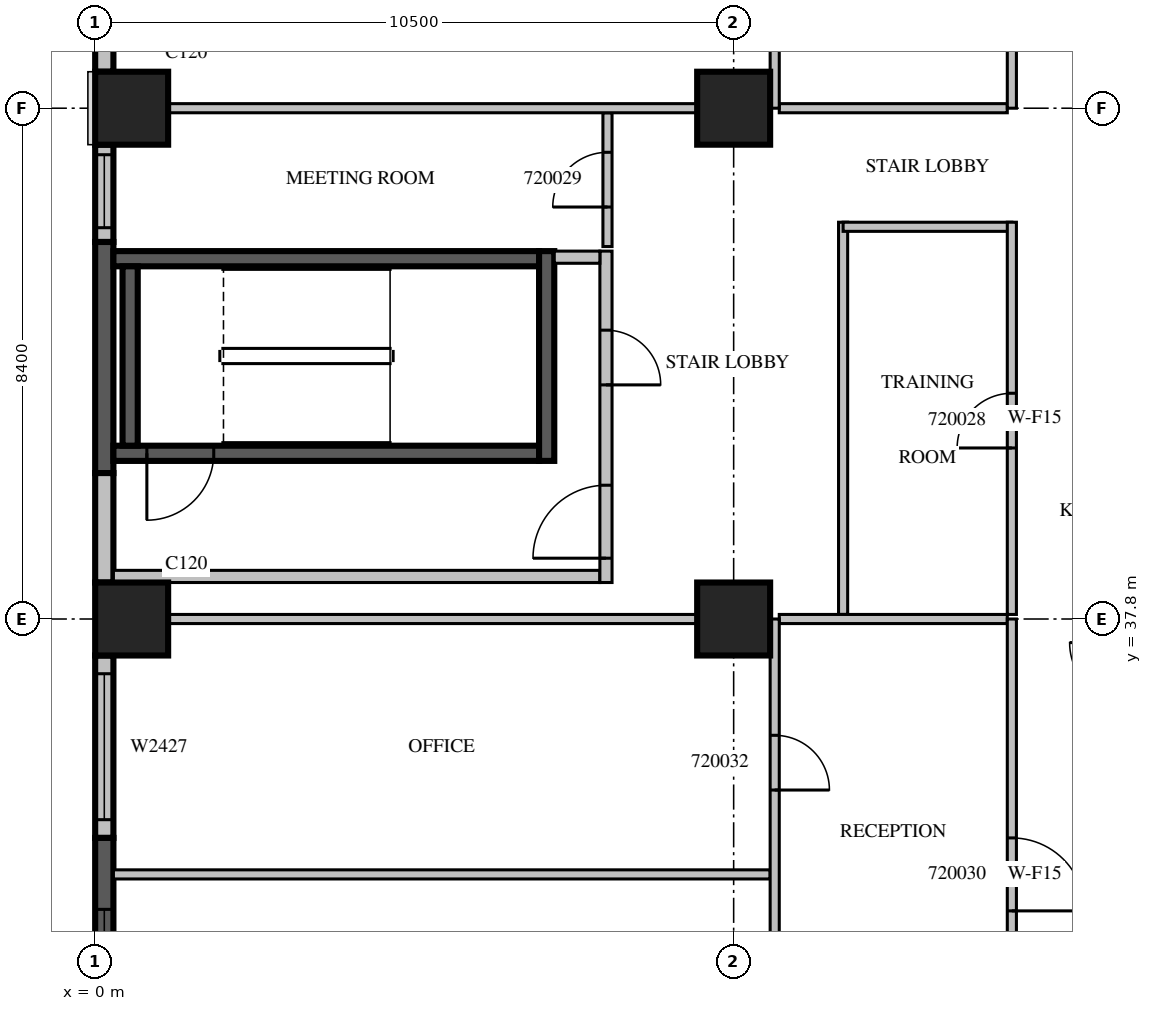
"""IFC4 building model, lengths in metres.
Left out: names, types, materials, properties, quantities, classifications, styles, units other than length and angle.
Written with IfcOpenShell. Run it as: python <this file> out.ifc"""

import sys

from ifc_helpers import new_model, si_unit, direction, frame, frame_2d, origin, origin_2d, place, context, subcontext, project, spatial, rectangle, extrude, source, transform, mapped, element, fill, save


model = new_model("IFC4")
c1 = context("Model", 3, precision=1e-05, world=origin(), true_north=direction((0.0, 1.0)))
c2 = subcontext(c1, "Body", "Model", "MODEL_VIEW")
j1 = project(units=[si_unit("LENGTHUNIT", "METRE"), si_unit("PLANEANGLEUNIT", "RADIAN")], contexts=[c1])
p1 = place(None, origin())
s1 = spatial("IfcSite", under=j1, at=p1, CompositionType="ELEMENT")
p2 = place(p1, origin())
s2 = spatial("IfcBuilding", under=s1, at=p2, CompositionType="ELEMENT")
p3 = place(p2, frame((0.0, 0.0, 95.1)))
s3 = spatial("IfcBuildingStorey", under=s2, at=p3, CompositionType="ELEMENT", Elevation=95.1)
m1 = source(origin(), c2, "Body", "SweptSolid", [
    extrude(rectangle(XDim=1.2, YDim=1.2, at=origin_2d()), origin(), (0.0, 0.0, 1.0), 4.2),
])
for number, where, z_axis, x_axis in (
    (1, (0.6, 37.8, 0.0), (0.0, 0.0, 1.0), (1.0, 0.0, 0.0)),
    (2, (10.5, 37.8, 0.0), (0.0, 0.0, 1.0), (1.0, 0.0, 0.0)),
    (3, (0.6, 46.2, 0.0), (0.0, 0.0, 1.0), (1.0, 0.0, 0.0)),
    (4, (10.5, 46.2, 0.0), (0.0, 0.0, 1.0), (1.0, 0.0, 0.0)),
):
    element("IfcColumn", number, at=place(p3, frame(where, z_axis=z_axis, x_axis=x_axis)), inside=s3, PredefinedType="COLUMN", context=c2, shape_type="MappedRepresentation", body=[
        mapped(m1, transform((0.0, 0.0, 0.0), scale=1.0)),
    ])
m2 = source(origin(), c2, "Body", "SweptSolid", [
    extrude(rectangle(XDim=0.66, YDim=0.3, at=frame_2d((0.33, 0.0))), origin(), (0.0, 0.0, 1.0), 3.8),
])
p4 = place(p3, frame((0.15, 47.46, 0.0), z_axis=(0.0, 0.0, 1.0), x_axis=(0.0, -1.0, 0.0)))
e5 = element("IfcWall", 5, at=p4, inside=s3, PredefinedType="STANDARD", context=c2, shape_type="MappedRepresentation", body=[
    mapped(m2, transform((0.0, 0.0, 0.0), scale=1.0)),
])
m3 = source(origin(), c2, "Body", "SweptSolid", [
    extrude(rectangle(XDim=1.6, YDim=0.3, at=frame_2d((0.8, 0.0))), origin(), (0.0, 0.0, 1.0), 3.8),
])
p5 = place(p3, frame((0.15, 45.6, 0.0), z_axis=(0.0, 0.0, 1.0), x_axis=(0.0, -1.0, 0.0)))
e6 = element("IfcWall", 6, at=p5, inside=s3, PredefinedType="STANDARD", context=c2, shape_type="MappedRepresentation", body=[
    mapped(m3, transform((0.0, 0.0, 0.0), scale=1.0)),
])
m4 = source(origin(), c2, "Body", "SweptSolid", [
    extrude(rectangle(XDim=1.2, YDim=2.7, at=frame_2d((0.6, 1.35))), frame((0.0, 0.16, 0.0), z_axis=(0.0, -1.0, 0.0), x_axis=(1.0, 0.0, 0.0)), (0.0, 0.0, 1.0), 0.32),
])
p6 = place(p5, frame((0.165, 0.0, 0.6)))
e7 = element("IfcOpeningElement", 7, at=p6, cuts=e6, PredefinedType="OPENING", context=c2, shape_type="MappedRepresentation", body=[
    mapped(m4, transform((0.0, 0.0, 0.0), scale=1.0)),
])
m5 = source(origin(), c2, "Body", "SweptSolid", [
    extrude(rectangle(XDim=3.8, YDim=0.3, at=frame_2d((1.9, 0.0))), origin(), (0.0, 0.0, 1.0), 3.8),
])
p7 = place(p3, frame((0.15, 44.0, 0.0), z_axis=(0.0, 0.0, 1.0), x_axis=(0.0, -1.0, 0.0)))
e8 = element("IfcWall", 8, at=p7, inside=s3, PredefinedType="SOLIDWALL", context=c2, shape_type="MappedRepresentation", body=[
    mapped(m5, transform((0.0, 0.0, 0.0), scale=1.0)),
])
m6 = source(origin(), c2, "Body", "SweptSolid", [
    extrude(rectangle(XDim=1.8, YDim=0.3, at=frame_2d((0.9, 0.0))), origin(), (0.0, 0.0, 1.0), 3.8),
])
p8 = place(p3, frame((0.15, 40.2, 0.0), z_axis=(0.0, 0.0, 1.0), x_axis=(0.0, -1.0, 0.0)))
e9 = element("IfcWall", 9, at=p8, inside=s3, PredefinedType="STANDARD", context=c2, shape_type="MappedRepresentation", body=[
    mapped(m6, transform((0.0, 0.0, 0.0), scale=1.0)),
])
m7 = source(origin(), c2, "Body", "SweptSolid", [
    extrude(rectangle(XDim=3.0, YDim=0.3, at=frame_2d((1.5, 0.0))), origin(), (0.0, 0.0, 1.0), 3.8),
])
p9 = place(p3, frame((0.15, 37.2, 0.0), z_axis=(0.0, 0.0, 1.0), x_axis=(0.0, -1.0, 0.0)))
e10 = element("IfcWall", 10, at=p9, inside=s3, PredefinedType="STANDARD", context=c2, shape_type="MappedRepresentation", body=[
    mapped(m7, transform((0.0, 0.0, 0.0), scale=1.0)),
])
m8 = source(origin(), c2, "Body", "SweptSolid", [
    extrude(rectangle(XDim=2.4, YDim=2.7, at=frame_2d((1.2, 1.35))), frame((0.0, 0.16, 0.0), z_axis=(0.0, -1.0, 0.0), x_axis=(1.0, 0.0, 0.0)), (0.0, 0.0, 1.0), 0.32),
])
p10 = place(p9, frame((0.3, 0.0, 0.6)))
e11 = element("IfcOpeningElement", 11, at=p10, cuts=e10, PredefinedType="OPENING", context=c2, shape_type="MappedRepresentation", body=[
    mapped(m8, transform((0.0, 0.0, 0.0), scale=1.0)),
])
m9 = source(origin(), c2, "Body", "SweptSolid", [
    extrude(rectangle(XDim=4.2, YDim=0.3, at=frame_2d((2.1, 0.0))), origin(), (0.0, 0.0, 1.0), 3.8),
])
p11 = place(p3, frame((0.15, 34.2, 0.0), z_axis=(0.0, 0.0, 1.0), x_axis=(0.0, -1.0, 0.0)))
e12 = element("IfcWall", 12, at=p11, inside=s3, PredefinedType="SOLIDWALL", context=c2, shape_type="MappedRepresentation", body=[
    mapped(m9, transform((0.0, 0.0, 0.0), scale=1.0)),
])
m10 = source(origin(), c2, "Body", "SweptSolid", [
    extrude(rectangle(XDim=1.8, YDim=2.7, at=frame_2d((0.9, 1.35))), frame((0.0, 0.16, 0.0), z_axis=(0.0, -1.0, 0.0), x_axis=(1.0, 0.0, 0.0)), (0.0, 0.0, 1.0), 0.32),
])
p12 = place(p11, frame((1.175, 0.0, 0.6)))
e13 = element("IfcOpeningElement", 13, at=p12, cuts=e12, PredefinedType="OPENING", context=c2, shape_type="MappedRepresentation", body=[
    mapped(m10, transform((0.0, 0.0, 0.0), scale=1.0)),
])
m11 = source(origin(), c2, "Body", "SweptSolid", [
    extrude(rectangle(XDim=7.0, YDim=0.25, at=frame_2d((3.5, 0.0))), origin(), (0.0, 0.0, 1.0), 3.8),
])
p13 = place(p3, frame((0.3, 40.525, 0.0), z_axis=(0.0, 0.0, 1.0), x_axis=(1.0, 0.0, 0.0)))
e14 = element("IfcWall", 14, at=p13, inside=s3, PredefinedType="SOLIDWALL", context=c2, shape_type="MappedRepresentation", body=[
    mapped(m11, transform((0.0, 0.0, 0.0), scale=1.0)),
])
m12 = source(origin(), c2, "Body", "SweptSolid", [
    extrude(rectangle(XDim=1.1, YDim=2.1, at=frame_2d((0.55, 1.05))), frame((0.0, 0.135, 0.0), z_axis=(0.0, -1.0, 0.0), x_axis=(1.0, 0.0, 0.0)), (0.0, 0.0, 1.0), 0.27),
])
p14 = place(p13, frame((0.55, 0.0, 0.0)))
e15 = element("IfcOpeningElement", 15, at=p14, cuts=e14, PredefinedType="OPENING", context=c2, shape_type="MappedRepresentation", body=[
    mapped(m12, transform((0.0, 0.0, 0.0), scale=1.0)),
])
p15 = place(p3, frame((0.3, 43.725, 0.0), z_axis=(0.0, 0.0, 1.0), x_axis=(1.0, 0.0, 0.0)))
e16 = element("IfcWall", 16, at=p15, inside=s3, PredefinedType="SOLIDWALL", context=c2, shape_type="MappedRepresentation", body=[
    mapped(m11, transform((0.0, 0.0, 0.0), scale=1.0)),
])
m13 = source(origin(), c2, "Body", "SweptSolid", [
    extrude(rectangle(XDim=3.45, YDim=0.25, at=frame_2d((1.725, 0.0))), origin(), (0.0, 0.0, 1.0), 3.8),
])
p16 = place(p3, frame((7.425, 40.4, 0.0), z_axis=(0.0, 0.0, 1.0), x_axis=(0.0, 1.0, 0.0)))
e17 = element("IfcWall", 17, at=p16, inside=s3, PredefinedType="SOLIDWALL", context=c2, shape_type="MappedRepresentation", body=[
    mapped(m13, transform((0.0, 0.0, 0.0), scale=1.0)),
])
m14 = source(origin(), c2, "Body", "SweptSolid", [
    extrude(rectangle(XDim=2.95, YDim=0.25, at=frame_2d((1.475, 0.0))), origin(), (0.0, 0.0, 1.0), 3.8),
])
p17 = place(p3, frame((0.575, 40.65, 0.0), z_axis=(0.0, 0.0, 1.0), x_axis=(0.0, 1.0, 0.0)))
e18 = element("IfcWall", 18, at=p17, inside=s3, PredefinedType="SOLIDWALL", context=c2, shape_type="MappedRepresentation", body=[
    mapped(m14, transform((0.0, 0.0, 0.0), scale=1.0)),
])
m15 = source(origin(), c2, "Body", "SweptSolid", [
    extrude(rectangle(XDim=8.0, YDim=0.2, at=frame_2d((4.0, 0.0))), origin(), (0.0, 0.0, 1.0), 3.8),
])
p18 = place(p3, frame((0.3, 38.5, 0.0), z_axis=(0.0, 0.0, 1.0), x_axis=(1.0, 0.0, 0.0)))
e19 = element("IfcWall", 19, at=p18, inside=s3, PredefinedType="PARTITIONING", context=c2, shape_type="MappedRepresentation", body=[
    mapped(m15, transform((0.0, 0.0, 0.0), scale=1.0)),
])
m16 = source(origin(), c2, "Body", "SweptSolid", [
    extrude(rectangle(XDim=5.45, YDim=0.2, at=frame_2d((2.725, 0.0))), origin(), (0.0, 0.0, 1.0), 3.8),
])
p19 = place(p3, frame((8.4, 38.4, 0.0), z_axis=(0.0, 0.0, 1.0), x_axis=(0.0, 1.0, 0.0)))
e20 = element("IfcWall", 20, at=p19, inside=s3, PredefinedType="PARTITIONING", context=c2, shape_type="MappedRepresentation", body=[
    mapped(m16, transform((0.0, 0.0, 0.0), scale=1.0)),
])
m17 = source(origin(), c2, "Body", "SweptSolid", [
    extrude(rectangle(XDim=1.2, YDim=2.1, at=frame_2d((0.6, 1.05))), frame((0.0, 0.11, 0.0), z_axis=(0.0, -1.0, 0.0), x_axis=(1.0, 0.0, 0.0)), (0.0, 0.0, 1.0), 0.22),
])
p20 = place(p19, frame((0.4, 0.0, 0.0)))
e21 = element("IfcOpeningElement", 21, at=p20, cuts=e20, PredefinedType="OPENING", context=c2, shape_type="MappedRepresentation", body=[
    mapped(m17, transform((0.0, 0.0, 0.0), scale=1.0)),
])
m18 = source(origin(), c2, "Body", "SweptSolid", [
    extrude(rectangle(XDim=0.9, YDim=2.1, at=frame_2d((0.45, 1.05))), frame((0.0, 0.11, 0.0), z_axis=(0.0, -1.0, 0.0), x_axis=(1.0, 0.0, 0.0)), (0.0, 0.0, 1.0), 0.22),
])
p21 = place(p19, frame((3.25, 0.0, 0.0)))
e22 = element("IfcOpeningElement", 22, at=p21, cuts=e20, PredefinedType="OPENING", context=c2, shape_type="MappedRepresentation", body=[
    mapped(m18, transform((0.0, 0.0, 0.0), scale=1.0)),
])
m19 = source(origin(), c2, "Body", "SweptSolid", [
    extrude(rectangle(XDim=0.75, YDim=0.2, at=frame_2d((0.375, 0.0))), origin(), (0.0, 0.0, 1.0), 3.8),
])
p22 = place(p3, frame((7.55, 43.75, 0.0), z_axis=(0.0, 0.0, 1.0), x_axis=(1.0, 0.0, 0.0)))
e23 = element("IfcWall", 23, at=p22, inside=s3, PredefinedType="PARTITIONING", context=c2, shape_type="MappedRepresentation", body=[
    mapped(m19, transform((0.0, 0.0, 0.0), scale=1.0)),
])
m20 = source(origin(), c2, "Body", "SweptSolid", [
    extrude(rectangle(XDim=6.45, YDim=0.15, at=frame_2d((3.225, 0.0))), origin(), (0.0, 0.0, 1.0), 3.8),
])
p23 = place(p3, frame((12.3, 44.325, 0.0), z_axis=(0.0, 0.0, 1.0), x_axis=(0.0, -1.0, 0.0)))
e24 = element("IfcWall", 24, at=p23, inside=s3, PredefinedType="PARTITIONING", context=c2, shape_type="MappedRepresentation", body=[
    mapped(m20, transform((0.0, 0.0, 0.0), scale=1.0)),
])
m21 = source(origin(), c2, "Body", "SweptSolid", [
    extrude(rectangle(XDim=2.775, YDim=0.15, at=frame_2d((1.387, 0.0))), origin(), (0.0, 0.0, 1.0), 3.8),
])
p24 = place(p3, frame((15.075, 44.25, 0.0), z_axis=(0.0, 0.0, 1.0), x_axis=(-1.0, 0.0, 0.0)))
e25 = element("IfcWall", 25, at=p24, inside=s3, PredefinedType="PARTITIONING", context=c2, shape_type="MappedRepresentation", body=[
    mapped(m21, transform((0.0, 0.0, 0.0), scale=1.0)),
])
p25 = place(p3, frame((15.075, 37.875, 0.0), z_axis=(0.0, 0.0, 1.0), x_axis=(0.0, 1.0, 0.0)))
e26 = element("IfcWall", 26, at=p25, inside=s3, PredefinedType="PARTITIONING", context=c2, shape_type="MappedRepresentation", body=[
    mapped(m20, transform((0.0, 0.0, 0.0), scale=1.0)),
])
m22 = source(origin(), c2, "Body", "SweptSolid", [
    extrude(rectangle(XDim=0.9, YDim=2.1, at=frame_2d((0.45, 1.05))), frame((0.0, 0.085, 0.0), z_axis=(0.0, -1.0, 0.0), x_axis=(1.0, 0.0, 0.0)), (0.0, 0.0, 1.0), 0.17),
])
p26 = place(p25, frame((2.737, 0.0, 0.0)))
e27 = element("IfcOpeningElement", 27, at=p26, cuts=e26, PredefinedType="OPENING", context=c2, shape_type="MappedRepresentation", body=[
    mapped(m22, transform((0.0, 0.0, 0.0), scale=1.0)),
])
m23 = source(origin(), c2, "Body", "SweptSolid", [
    extrude(rectangle(XDim=2.2, YDim=0.15, at=frame_2d((1.1, 0.0))), origin(), (0.0, 0.0, 1.0), 3.8),
])
p27 = place(p3, frame((8.425, 43.925, 0.0), z_axis=(0.0, 0.0, 1.0), x_axis=(0.0, 1.0, 0.0)))
e28 = element("IfcWall", 28, at=p27, inside=s3, PredefinedType="PARTITIONING", context=c2, shape_type="MappedRepresentation", body=[
    mapped(m23, transform((0.0, 0.0, 0.0), scale=1.0)),
])
p28 = place(p27, frame((0.65, 0.0, 0.0)))
e29 = element("IfcOpeningElement", 29, at=p28, cuts=e28, PredefinedType="OPENING", context=c2, shape_type="MappedRepresentation", body=[
    mapped(m22, transform((0.0, 0.0, 0.0), scale=1.0)),
])
m24 = source(origin(), c2, "Body", "SweptSolid", [
    extrude(rectangle(XDim=10.8, YDim=0.15, at=frame_2d((5.4, 0.0))), origin(), (0.0, 0.0, 1.0), 3.8),
])
p29 = place(p3, frame((11.1, 33.6, 0.0), z_axis=(0.0, 0.0, 1.0), x_axis=(-1.0, 0.0, 0.0)))
e30 = element("IfcWall", 30, at=p29, inside=s3, PredefinedType="PARTITIONING", context=c2, shape_type="MappedRepresentation", body=[
    mapped(m24, transform((0.0, 0.0, 0.0), scale=1.0)),
])
m25 = source(origin(), c2, "Body", "SweptSolid", [
    extrude(rectangle(XDim=8.702, YDim=0.15, at=frame_2d((4.351, 0.0))), origin(), (0.0, 0.0, 1.0), 3.8),
])
p30 = place(p3, frame((9.901, 37.8, 0.0), z_axis=(0.0, 0.0, 1.0), x_axis=(-1.0, 0.0, 0.0)))
e31 = element("IfcWall", 31, at=p30, inside=s3, PredefinedType="PARTITIONING", context=c2, shape_type="MappedRepresentation", body=[
    mapped(m25, transform((0.0, 0.0, 0.0), scale=1.0)),
])
m26 = source(origin(), c2, "Body", "SweptSolid", [
    extrude(rectangle(XDim=3.75, YDim=0.15, at=frame_2d((1.875, 0.0))), origin(), (0.0, 0.0, 1.0), 3.8),
])
p31 = place(p3, frame((15.0, 37.8, 0.0), z_axis=(0.0, 0.0, 1.0), x_axis=(-1.0, 0.0, 0.0)))
e32 = element("IfcWall", 32, at=p31, inside=s3, PredefinedType="PARTITIONING", context=c2, shape_type="MappedRepresentation", body=[
    mapped(m26, transform((0.0, 0.0, 0.0), scale=1.0)),
])
m27 = source(origin(), c2, "Body", "SweptSolid", [
    extrude(rectangle(XDim=8.4, YDim=0.15, at=frame_2d((4.2, 0.0))), origin(), (0.0, 0.0, 1.0), 3.8),
])
p32 = place(p3, frame((11.175, 29.4, 0.0), z_axis=(0.0, 0.0, 1.0), x_axis=(0.0, 1.0, 0.0)))
e33 = element("IfcWall", 33, at=p32, inside=s3, PredefinedType="PARTITIONING", context=c2, shape_type="MappedRepresentation", body=[
    mapped(m27, transform((0.0, 0.0, 0.0), scale=1.0)),
])
p33 = place(p32, frame((1.962, 0.0, 0.0)))
e34 = element("IfcOpeningElement", 34, at=p33, cuts=e33, PredefinedType="OPENING", context=c2, shape_type="MappedRepresentation", body=[
    mapped(m22, transform((0.0, 0.0, 0.0), scale=1.0)),
])
p34 = place(p32, frame((5.588, 0.0, 0.0)))
e35 = element("IfcOpeningElement", 35, at=p34, cuts=e33, PredefinedType="OPENING", context=c2, shape_type="MappedRepresentation", body=[
    mapped(m22, transform((0.0, 0.0, 0.0), scale=1.0)),
])
p35 = place(p3, frame((9.901, 46.2, 0.0), z_axis=(0.0, 0.0, 1.0), x_axis=(-1.0, 0.0, 0.0)))
e36 = element("IfcWall", 36, at=p35, inside=s3, PredefinedType="PARTITIONING", context=c2, shape_type="MappedRepresentation", body=[
    mapped(m25, transform((0.0, 0.0, 0.0), scale=1.0)),
])
p36 = place(p3, frame((15.0, 46.2, 0.0), z_axis=(0.0, 0.0, 1.0), x_axis=(-1.0, 0.0, 0.0)))
e37 = element("IfcWall", 37, at=p36, inside=s3, PredefinedType="PARTITIONING", context=c2, shape_type="MappedRepresentation", body=[
    mapped(m26, transform((0.0, 0.0, 0.0), scale=1.0)),
])
m28 = source(origin(), c2, "Body", "SweptSolid", [
    extrude(rectangle(XDim=13.14, YDim=0.15, at=frame_2d((6.57, 0.0))), origin(), (0.0, 0.0, 1.0), 3.8),
])
p37 = place(p3, frame((11.175, 46.2, 0.0), z_axis=(0.0, 0.0, 1.0), x_axis=(0.0, 1.0, 0.0)))
e38 = element("IfcWall", 38, at=p37, inside=s3, PredefinedType="PARTITIONING", context=c2, shape_type="MappedRepresentation", body=[
    mapped(m28, transform((0.0, 0.0, 0.0), scale=1.0)),
])
m29 = source(origin(), c2, "Body", "SweptSolid", [
    extrude(rectangle(XDim=1.1, YDim=2.1, at=frame_2d((0.55, 1.05))), frame((0.0, 0.085, 0.0), z_axis=(0.0, -1.0, 0.0), x_axis=(1.0, 0.0, 0.0)), (0.0, 0.0, 1.0), 0.17),
])
p38 = place(p37, frame((2.388, 0.0, 0.0)))
e39 = element("IfcOpeningElement", 39, at=p38, cuts=e38, PredefinedType="OPENING", context=c2, shape_type="MappedRepresentation", body=[
    mapped(m29, transform((0.0, 0.0, 0.0), scale=1.0)),
])
p39 = place(p3, frame((15.075, 29.4, 0.0), z_axis=(0.0, 0.0, 1.0), x_axis=(0.0, 1.0, 0.0)))
e40 = element("IfcWall", 40, at=p39, inside=s3, PredefinedType="PARTITIONING", context=c2, shape_type="MappedRepresentation", body=[
    mapped(m27, transform((0.0, 0.0, 0.0), scale=1.0)),
])
m30 = source(origin(), c2, "Body", "SweptSolid", [
    extrude(rectangle(XDim=1.2, YDim=2.1, at=frame_2d((0.6, 1.05))), frame((0.0, 0.085, 0.0), z_axis=(0.0, -1.0, 0.0), x_axis=(1.0, 0.0, 0.0)), (0.0, 0.0, 1.0), 0.17),
])
p40 = place(p39, frame((3.6, 0.0, 0.0)))
e41 = element("IfcOpeningElement", 41, at=p40, cuts=e40, PredefinedType="OPENING", context=c2, shape_type="MappedRepresentation", body=[
    mapped(m30, transform((0.0, 0.0, 0.0), scale=1.0)),
])
p41 = place(p3, frame((15.075, 46.2, 0.0), z_axis=(0.0, 0.0, 1.0), x_axis=(0.0, 1.0, 0.0)))
e42 = element("IfcWall", 42, at=p41, inside=s3, PredefinedType="PARTITIONING", context=c2, shape_type="MappedRepresentation", body=[
    mapped(m28, transform((0.0, 0.0, 0.0), scale=1.0)),
])
p42 = place(p41, frame((2.39, 0.0, 0.0)))
e43 = element("IfcOpeningElement", 43, at=p42, cuts=e42, PredefinedType="OPENING", context=c2, shape_type="MappedRepresentation", body=[
    mapped(m29, transform((0.0, 0.0, 0.0), scale=1.0)),
])
p43 = place(p41, frame((6.928, 0.0, 0.0)))
e44 = element("IfcOpeningElement", 44, at=p43, cuts=e42, PredefinedType="OPENING", context=c2, shape_type="MappedRepresentation", body=[
    mapped(m22, transform((0.0, 0.0, 0.0), scale=1.0)),
])
p44 = place(p41, frame((10.596, 0.0, 0.0)))
e45 = element("IfcOpeningElement", 45, at=p44, cuts=e42, PredefinedType="OPENING", context=c2, shape_type="MappedRepresentation", body=[
    mapped(m22, transform((0.0, 0.0, 0.0), scale=1.0)),
])
m31 = source(origin(), c2, "Body", "SweptSolid", [
    extrude(rectangle(XDim=1.2, YDim=2.7, at=frame_2d((0.6, 1.35))), frame((0.0, 0.03, 0.0), z_axis=(0.0, -1.0, 0.0), x_axis=(1.0, 0.0, 0.0)), (0.0, 0.0, 1.0), 0.06),
])
p45 = place(p6, origin())
e46 = element("IfcWindow", 46, at=p45, inside=s3, PartitioningType="SINGLE_PANEL", PredefinedType="WINDOW", context=c2, shape_type="MappedRepresentation", body=[
    mapped(m31, transform((0.0, 0.0, 0.0), scale=1.0)),
])
fill(e7, e46)
m32 = source(origin(), c2, "Body", "SweptSolid", [
    extrude(rectangle(XDim=2.4, YDim=2.7, at=frame_2d((1.2, 1.35))), frame((0.0, 0.03, 0.0), z_axis=(0.0, -1.0, 0.0), x_axis=(1.0, 0.0, 0.0)), (0.0, 0.0, 1.0), 0.06),
])
p46 = place(p10, origin())
e47 = element("IfcWindow", 47, at=p46, inside=s3, PartitioningType="SINGLE_PANEL", PredefinedType="WINDOW", context=c2, shape_type="MappedRepresentation", body=[
    mapped(m32, transform((0.0, 0.0, 0.0), scale=1.0)),
])
fill(e11, e47)
m33 = source(origin(), c2, "Body", "SweptSolid", [
    extrude(rectangle(XDim=1.8, YDim=2.7, at=frame_2d((0.9, 1.35))), frame((0.0, 0.03, 0.0), z_axis=(0.0, -1.0, 0.0), x_axis=(1.0, 0.0, 0.0)), (0.0, 0.0, 1.0), 0.06),
])
p47 = place(p12, origin())
e48 = element("IfcWindow", 48, at=p47, inside=s3, PartitioningType="SINGLE_PANEL", PredefinedType="WINDOW", context=c2, shape_type="MappedRepresentation", body=[
    mapped(m33, transform((0.0, 0.0, 0.0), scale=1.0)),
])
fill(e13, e48)
m34 = source(origin(), c2, "Body", "SweptSolid", [
    extrude(rectangle(XDim=1.1, YDim=2.1, at=frame_2d((0.55, 1.05))), frame((0.0, 0.025, 0.0), z_axis=(0.0, -1.0, 0.0), x_axis=(1.0, 0.0, 0.0)), (0.0, 0.0, 1.0), 0.05),
])
p48 = place(p14, origin())
e49 = element("IfcDoor", 49, at=p48, inside=s3, OperationType="SINGLE_SWING_RIGHT", PredefinedType="DOOR", context=c2, shape_type="MappedRepresentation", body=[
    mapped(m34, transform((0.0, 0.0, 0.0), scale=1.0)),
])
fill(e15, e49)
m35 = source(origin(), c2, "Body", "SweptSolid", [
    extrude(rectangle(XDim=1.2, YDim=2.1, at=frame_2d((0.6, 1.05))), frame((0.0, 0.025, 0.0), z_axis=(0.0, -1.0, 0.0), x_axis=(1.0, 0.0, 0.0)), (0.0, 0.0, 1.0), 0.05),
])
p49 = place(p20, origin())
e50 = element("IfcDoor", 50, at=p49, inside=s3, OperationType="SINGLE_SWING_LEFT", PredefinedType="DOOR", context=c2, shape_type="MappedRepresentation", body=[
    mapped(m35, transform((0.0, 0.0, 0.0), scale=1.0)),
])
fill(e21, e50)
m36 = source(origin(), c2, "Body", "SweptSolid", [
    extrude(rectangle(XDim=0.9, YDim=2.1, at=frame_2d((0.45, 1.05))), frame((0.0, 0.025, 0.0), z_axis=(0.0, -1.0, 0.0), x_axis=(1.0, 0.0, 0.0)), (0.0, 0.0, 1.0), 0.05),
])
p50 = place(p21, origin())
e51 = element("IfcDoor", 51, at=p50, inside=s3, OperationType="SINGLE_SWING_RIGHT", PredefinedType="DOOR", context=c2, shape_type="MappedRepresentation", body=[
    mapped(m36, transform((0.0, 0.0, 0.0), scale=1.0)),
])
fill(e22, e51)
p51 = place(p26, origin())
e52 = element("IfcDoor", 52, at=p51, inside=s3, OperationType="SINGLE_SWING_LEFT", PredefinedType="DOOR", context=c2, shape_type="MappedRepresentation", body=[
    mapped(m36, transform((0.0, 0.0, 0.0), scale=1.0)),
])
fill(e27, e52)
p52 = place(p28, origin())
e53 = element("IfcDoor", 53, at=p52, inside=s3, OperationType="SINGLE_SWING_LEFT", PredefinedType="DOOR", context=c2, shape_type="MappedRepresentation", body=[
    mapped(m36, transform((0.0, 0.0, 0.0), scale=1.0)),
])
fill(e29, e53)
p53 = place(p40, origin())
e54 = element("IfcDoor", 54, at=p53, inside=s3, OperationType="SINGLE_SWING_RIGHT", PredefinedType="DOOR", context=c2, shape_type="MappedRepresentation", body=[
    mapped(m35, transform((0.0, 0.0, 0.0), scale=1.0)),
])
fill(e41, e54)
p54 = place(p34, origin())
e55 = element("IfcDoor", 55, at=p54, inside=s3, OperationType="SINGLE_SWING_RIGHT", PredefinedType="DOOR", context=c2, shape_type="MappedRepresentation", body=[
    mapped(m36, transform((0.0, 0.0, 0.0), scale=1.0)),
])
fill(e35, e55)
save(model, sys.argv[1])
